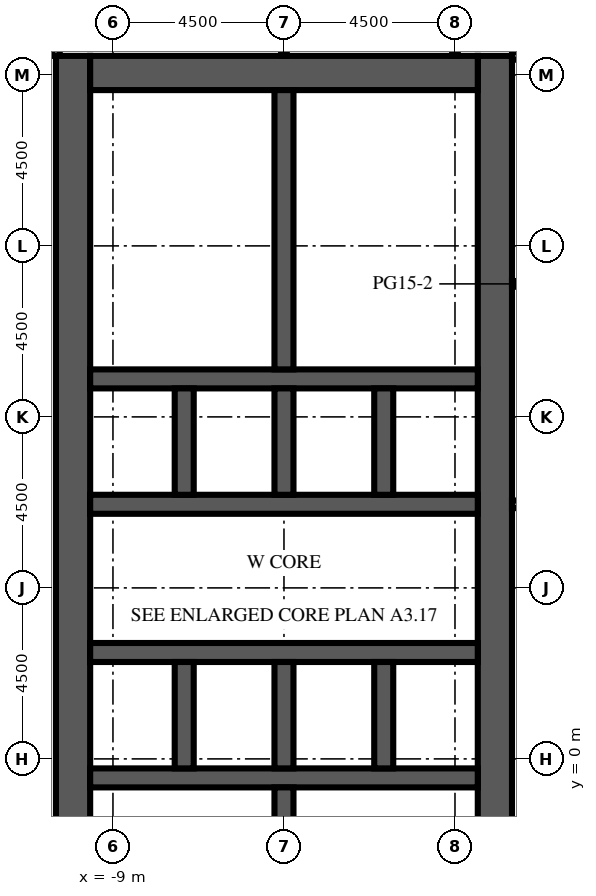
"""IFC4 building model, lengths in metres.
Left out: names, types, materials, properties, quantities, classifications, styles, units other than length and angle.
Written with IfcOpenShell. Run it as: python <this file> out.ifc"""

import sys

from ifc_helpers import new_model, si_unit, direction, frame, frame_2d, origin, place, context, subcontext, project, spatial, rectangle, extrude, element, fill, save


model = new_model("IFC4")
c1 = context("Model", 3, precision=1e-05, world=origin(), true_north=direction((0.0, 1.0)))
c2 = subcontext(c1, "Body", "Model", "MODEL_VIEW")
j1 = project(units=[si_unit("LENGTHUNIT", "METRE"), si_unit("PLANEANGLEUNIT", "RADIAN")], contexts=[c1])
p1 = place(None, origin())
s1 = spatial("IfcSite", under=j1, at=p1, CompositionType="ELEMENT")
p2 = place(p1, origin())
s2 = spatial("IfcBuilding", under=s1, at=p2, CompositionType="ELEMENT")
p3 = place(p2, frame((0.0, 0.0, 106.6)))
s3 = spatial("IfcBuildingStorey", under=s2, at=p3, CompositionType="ELEMENT", Elevation=106.6)
p4 = place(p3, frame((-10.05, -9.0, 0.0), z_axis=(0.0, 0.0, 1.0), x_axis=(0.0, 1.0, 0.0)))
e1 = element("IfcWall", 1, at=p4, inside=s3, PredefinedType="SHEAR", context=c2, shape_type="SweptSolid", body=[
    extrude(rectangle(XDim=27.5, YDim=0.9, at=frame_2d((13.75, 0.0))), origin(), (0.0, 0.0, 1.0), 4.1),
])
p5 = place(p4, frame((12.55, 0.0, 0.0)))
e2 = element("IfcOpeningElement", 2, at=p5, cuts=e1, PredefinedType="OPENING", context=c2, shape_type="SweptSolid", body=[
    extrude(rectangle(XDim=2.4, YDim=2.4, at=frame_2d((1.2, 1.2))), frame((0.0, 0.46, 0.0), z_axis=(0.0, -1.0, 0.0), x_axis=(1.0, 0.0, 0.0)), (0.0, 0.0, 1.0), 0.92),
])
p6 = place(p4, frame((6.825, 0.0, 0.0)))
e3 = element("IfcOpeningElement", 3, at=p6, cuts=e1, PredefinedType="OPENING", context=c2, shape_type="SweptSolid", body=[
    extrude(rectangle(XDim=1.2, YDim=2.1, at=frame_2d((0.6, 1.05))), frame((0.0, 0.46, 0.0), z_axis=(0.0, -1.0, 0.0), x_axis=(1.0, 0.0, 0.0)), (0.0, 0.0, 1.0), 0.92),
])
p7 = place(p4, frame((19.475, 0.0, 0.0)))
e4 = element("IfcOpeningElement", 4, at=p7, cuts=e1, PredefinedType="OPENING", context=c2, shape_type="SweptSolid", body=[
    extrude(rectangle(XDim=1.2, YDim=2.1, at=frame_2d((0.6, 1.05))), frame((0.0, 0.46, 0.0), z_axis=(0.0, -1.0, 0.0), x_axis=(1.0, 0.0, 0.0)), (0.0, 0.0, 1.0), 0.92),
])
p8 = place(p3, frame((1.05, -9.0, 0.0), z_axis=(0.0, 0.0, 1.0), x_axis=(0.0, 1.0, 0.0)))
e5 = element("IfcWall", 5, at=p8, inside=s3, PredefinedType="SHEAR", context=c2, shape_type="SweptSolid", body=[
    extrude(rectangle(XDim=27.5, YDim=0.9, at=frame_2d((13.75, 0.0))), origin(), (0.0, 0.0, 1.0), 4.1),
])
p9 = place(p8, frame((12.55, 0.0, 0.0)))
e6 = element("IfcOpeningElement", 6, at=p9, cuts=e5, PredefinedType="OPENING", context=c2, shape_type="SweptSolid", body=[
    extrude(rectangle(XDim=2.4, YDim=2.4, at=frame_2d((1.2, 1.2))), frame((0.0, 0.46, 0.0), z_axis=(0.0, -1.0, 0.0), x_axis=(1.0, 0.0, 0.0)), (0.0, 0.0, 1.0), 0.92),
])
p10 = place(p8, frame((3.893, 0.0, 0.0)))
e7 = element("IfcOpeningElement", 7, at=p10, cuts=e5, PredefinedType="OPENING", context=c2, shape_type="SweptSolid", body=[
    extrude(rectangle(XDim=0.923, YDim=2.1, at=frame_2d((0.461, 1.05))), frame((0.0, 0.46, 0.0), z_axis=(0.0, -1.0, 0.0), x_axis=(1.0, 0.0, 0.0)), (0.0, 0.0, 1.0), 0.92),
])
p11 = place(p8, frame((23.427, 0.0, 0.0)))
e8 = element("IfcOpeningElement", 8, at=p11, cuts=e5, PredefinedType="OPENING", context=c2, shape_type="SweptSolid", body=[
    extrude(rectangle(XDim=1.2, YDim=2.1, at=frame_2d((0.6, 1.05))), frame((0.0, 0.46, 0.0), z_axis=(0.0, -1.0, 0.0), x_axis=(1.0, 0.0, 0.0)), (0.0, 0.0, 1.0), 0.92),
])
p12 = place(p3, frame((-9.6, 18.05, 0.0), z_axis=(0.0, 0.0, 1.0), x_axis=(1.0, 0.0, 0.0)))
e9 = element("IfcWall", 9, at=p12, inside=s3, PredefinedType="SHEAR", context=c2, shape_type="SweptSolid", body=[
    extrude(rectangle(XDim=10.2, YDim=0.9, at=frame_2d((5.1, 0.0))), origin(), (0.0, 0.0, 1.0), 4.1),
])
p13 = place(p3, frame((-9.6, -0.5, 0.0), z_axis=(0.0, 0.0, 1.0), x_axis=(1.0, 0.0, 0.0)))
e10 = element("IfcWall", 10, at=p13, inside=s3, PredefinedType="SHEAR", context=c2, shape_type="SweptSolid", body=[
    extrude(rectangle(XDim=10.2, YDim=0.5, at=frame_2d((5.1, 0.0))), origin(), (0.0, 0.0, 1.0), 4.1),
])
p14 = place(p3, frame((-9.6, 2.8, 0.0), z_axis=(0.0, 0.0, 1.0), x_axis=(1.0, 0.0, 0.0)))
e11 = element("IfcWall", 11, at=p14, inside=s3, PredefinedType="SHEAR", context=c2, shape_type="SweptSolid", body=[
    extrude(rectangle(XDim=10.2, YDim=0.5, at=frame_2d((5.1, 0.0))), origin(), (0.0, 0.0, 1.0), 4.1),
])
p15 = place(p14, frame((0.562, 0.0, 0.0)))
e12 = element("IfcOpeningElement", 12, at=p15, cuts=e11, PredefinedType="OPENING", context=c2, shape_type="SweptSolid", body=[
    extrude(rectangle(XDim=1.1, YDim=2.1, at=frame_2d((0.55, 1.05))), frame((0.0, 0.26, 0.0), z_axis=(0.0, -1.0, 0.0), x_axis=(1.0, 0.0, 0.0)), (0.0, 0.0, 1.0), 0.52),
])
p16 = place(p14, frame((3.238, 0.0, 0.0)))
e13 = element("IfcOpeningElement", 13, at=p16, cuts=e11, PredefinedType="OPENING", context=c2, shape_type="SweptSolid", body=[
    extrude(rectangle(XDim=1.1, YDim=2.1, at=frame_2d((0.55, 1.05))), frame((0.0, 0.26, 0.0), z_axis=(0.0, -1.0, 0.0), x_axis=(1.0, 0.0, 0.0)), (0.0, 0.0, 1.0), 0.52),
])
p17 = place(p14, frame((8.538, 0.0, 0.0)))
e14 = element("IfcOpeningElement", 14, at=p17, cuts=e11, PredefinedType="OPENING", context=c2, shape_type="SweptSolid", body=[
    extrude(rectangle(XDim=1.1, YDim=2.1, at=frame_2d((0.55, 1.05))), frame((0.0, 0.26, 0.0), z_axis=(0.0, -1.0, 0.0), x_axis=(1.0, 0.0, 0.0)), (0.0, 0.0, 1.0), 0.52),
])
p18 = place(p3, frame((-9.6, 6.7, 0.0), z_axis=(0.0, 0.0, 1.0), x_axis=(1.0, 0.0, 0.0)))
e15 = element("IfcWall", 15, at=p18, inside=s3, PredefinedType="SHEAR", context=c2, shape_type="SweptSolid", body=[
    extrude(rectangle(XDim=10.2, YDim=0.5, at=frame_2d((5.1, 0.0))), origin(), (0.0, 0.0, 1.0), 4.1),
])
p19 = place(p18, frame((0.562, 0.0, 0.0)))
e16 = element("IfcOpeningElement", 16, at=p19, cuts=e15, PredefinedType="OPENING", context=c2, shape_type="SweptSolid", body=[
    extrude(rectangle(XDim=1.1, YDim=2.1, at=frame_2d((0.55, 1.05))), frame((0.0, 0.26, 0.0), z_axis=(0.0, -1.0, 0.0), x_axis=(1.0, 0.0, 0.0)), (0.0, 0.0, 1.0), 0.52),
])
p20 = place(p18, frame((3.288, 0.0, 0.0)))
e17 = element("IfcOpeningElement", 17, at=p20, cuts=e15, PredefinedType="OPENING", context=c2, shape_type="SweptSolid", body=[
    extrude(rectangle(XDim=1.0, YDim=2.1, at=frame_2d((0.5, 1.05))), frame((0.0, 0.26, 0.0), z_axis=(0.0, -1.0, 0.0), x_axis=(1.0, 0.0, 0.0)), (0.0, 0.0, 1.0), 0.52),
])
p21 = place(p18, frame((5.913, 0.0, 0.0)))
e18 = element("IfcOpeningElement", 18, at=p21, cuts=e15, PredefinedType="OPENING", context=c2, shape_type="SweptSolid", body=[
    extrude(rectangle(XDim=1.0, YDim=2.1, at=frame_2d((0.5, 1.05))), frame((0.0, 0.26, 0.0), z_axis=(0.0, -1.0, 0.0), x_axis=(1.0, 0.0, 0.0)), (0.0, 0.0, 1.0), 0.52),
])
p22 = place(p18, frame((8.587, 0.0, 0.0)))
e19 = element("IfcOpeningElement", 19, at=p22, cuts=e15, PredefinedType="OPENING", context=c2, shape_type="SweptSolid", body=[
    extrude(rectangle(XDim=1.0, YDim=2.1, at=frame_2d((0.5, 1.05))), frame((0.0, 0.26, 0.0), z_axis=(0.0, -1.0, 0.0), x_axis=(1.0, 0.0, 0.0)), (0.0, 0.0, 1.0), 0.52),
])
p23 = place(p3, frame((-9.6, 10.0, 0.0), z_axis=(0.0, 0.0, 1.0), x_axis=(1.0, 0.0, 0.0)))
e20 = element("IfcWall", 20, at=p23, inside=s3, PredefinedType="SHEAR", context=c2, shape_type="SweptSolid", body=[
    extrude(rectangle(XDim=10.2, YDim=0.5, at=frame_2d((5.1, 0.0))), origin(), (0.0, 0.0, 1.0), 4.1),
])
for number, where, z_axis, x_axis in (
    (21, (-7.125, -0.25, 0.0), (0.0, 0.0, 1.0), (0.0, 1.0, 0.0)),
    (22, (-7.125, 6.95, 0.0), (0.0, 0.0, 1.0), (0.0, 1.0, 0.0)),
    (23, (-4.5, -0.25, 0.0), (0.0, 0.0, 1.0), (0.0, 1.0, 0.0)),
    (24, (-4.5, 6.95, 0.0), (0.0, 0.0, 1.0), (0.0, 1.0, 0.0)),
    (25, (-1.875, -0.25, 0.0), (0.0, 0.0, 1.0), (0.0, 1.0, 0.0)),
    (26, (-1.875, 6.95, 0.0), (0.0, 0.0, 1.0), (0.0, 1.0, 0.0)),
):
    element("IfcWall", number, at=place(p3, frame(where, z_axis=z_axis, x_axis=x_axis)), inside=s3, PredefinedType="SHEAR", context=c2, shape_type="SweptSolid", body=[
        extrude(rectangle(XDim=2.8, YDim=0.5, at=frame_2d((1.4, 0.0))), origin(), (0.0, 0.0, 1.0), 4.1),
    ])
for number, where, z_axis, x_axis in (
    (27, (-4.5, -8.1, 0.0), (0.0, 0.0, 1.0), (0.0, 1.0, 0.0)),
    (28, (-4.5, 10.25, 0.0), (0.0, 0.0, 1.0), (0.0, 1.0, 0.0)),
):
    element("IfcWall", number, at=place(p3, frame(where, z_axis=z_axis, x_axis=x_axis)), inside=s3, PredefinedType="SHEAR", context=c2, shape_type="SweptSolid", body=[
        extrude(rectangle(XDim=7.35, YDim=0.5, at=frame_2d((3.675, 0.0))), origin(), (0.0, 0.0, 1.0), 4.1),
    ])
p24 = place(p3, frame((-2.407, -3.984, 0.0), z_axis=(0.0, 0.0, 1.0), x_axis=(0.0, 1.0, 0.0)))
e29 = element("IfcWall", 29, at=p24, inside=s3, PredefinedType="PARTITIONING", context=c2, shape_type="SweptSolid", body=[
    extrude(rectangle(XDim=3.234, YDim=0.1, at=frame_2d((1.617, 0.0))), origin(), (0.0, 0.0, 1.0), 3.5),
])
p25 = place(p3, frame((-0.7, 12.455, 0.0), z_axis=(0.0, 0.0, 1.0), x_axis=(1.0, 0.0, 0.0)))
e30 = element("IfcWall", 30, at=p25, inside=s3, PredefinedType="PARTITIONING", context=c2, shape_type="SweptSolid", body=[
    extrude(rectangle(XDim=1.3, YDim=0.1, at=frame_2d((0.65, 0.0))), origin(), (0.0, 0.0, 1.0), 3.5),
])
p26 = place(p25, frame((0.2, 0.0, 0.0)))
e31 = element("IfcOpeningElement", 31, at=p26, cuts=e30, PredefinedType="OPENING", context=c2, shape_type="SweptSolid", body=[
    extrude(rectangle(XDim=0.9, YDim=2.1, at=frame_2d((0.45, 1.05))), frame((0.0, 0.06, 0.0), z_axis=(0.0, -1.0, 0.0), x_axis=(1.0, 0.0, 0.0)), (0.0, 0.0, 1.0), 0.12),
])
p27 = place(p3, frame((-4.25, 12.455, 0.0), z_axis=(0.0, 0.0, 1.0), x_axis=(1.0, 0.0, 0.0)))
e32 = element("IfcWall", 32, at=p27, inside=s3, PredefinedType="PARTITIONING", context=c2, shape_type="SweptSolid", body=[
    extrude(rectangle(XDim=3.55, YDim=0.1, at=frame_2d((1.775, 0.0))), origin(), (0.0, 0.0, 1.0), 3.5),
])
p28 = place(p3, frame((-0.7, 12.455, 0.0), z_axis=(0.0, 0.0, 1.0), x_axis=(0.0, 1.0, 0.0)))
e33 = element("IfcWall", 33, at=p28, inside=s3, PredefinedType="PARTITIONING", context=c2, shape_type="SweptSolid", body=[
    extrude(rectangle(XDim=2.573, YDim=0.1, at=frame_2d((1.286, 0.0))), origin(), (0.0, 0.0, 1.0), 3.5),
])
p29 = place(p28, frame((0.786, 0.0, 0.0)))
e34 = element("IfcOpeningElement", 34, at=p29, cuts=e33, PredefinedType="OPENING", context=c2, shape_type="SweptSolid", body=[
    extrude(rectangle(XDim=1.0, YDim=2.1, at=frame_2d((0.5, 1.05))), frame((0.0, 0.06, 0.0), z_axis=(0.0, -1.0, 0.0), x_axis=(1.0, 0.0, 0.0)), (0.0, 0.0, 1.0), 0.12),
])
p30 = place(p3, frame((-0.7, 15.028, 0.0), z_axis=(0.0, 0.0, 1.0), x_axis=(0.0, 1.0, 0.0)))
e35 = element("IfcWall", 35, at=p30, inside=s3, PredefinedType="PARTITIONING", context=c2, shape_type="SweptSolid", body=[
    extrude(rectangle(XDim=2.573, YDim=0.1, at=frame_2d((1.286, 0.0))), origin(), (0.0, 0.0, 1.0), 3.5),
])
p31 = place(p30, frame((0.786, 0.0, 0.0)))
e36 = element("IfcOpeningElement", 36, at=p31, cuts=e35, PredefinedType="OPENING", context=c2, shape_type="SweptSolid", body=[
    extrude(rectangle(XDim=1.0, YDim=2.1, at=frame_2d((0.5, 1.05))), frame((0.0, 0.06, 0.0), z_axis=(0.0, -1.0, 0.0), x_axis=(1.0, 0.0, 0.0)), (0.0, 0.0, 1.0), 0.12),
])
p32 = place(p3, frame((-4.25, 15.028, 0.0), z_axis=(0.0, 0.0, 1.0), x_axis=(1.0, 0.0, 0.0)))
e37 = element("IfcWall", 37, at=p32, inside=s3, PredefinedType="PARTITIONING", context=c2, shape_type="SweptSolid", body=[
    extrude(rectangle(XDim=3.55, YDim=0.1, at=frame_2d((1.775, 0.0))), origin(), (0.0, 0.0, 1.0), 3.5),
])
p33 = place(p3, frame((-10.5, 31.35, 0.0), z_axis=(0.0, 0.0, 1.0), x_axis=(0.0, -1.0, 0.0)))
e38 = element("IfcWall", 38, at=p33, inside=s3, PredefinedType="PARTITIONING", context=c2, shape_type="SweptSolid", body=[
    extrude(rectangle(XDim=12.85, YDim=0.2, at=frame_2d((6.425, 0.0))), origin(), (0.0, 0.0, 1.0), 3.5),
])
p34 = place(p33, frame((2.5, 0.0, 0.0)))
e39 = element("IfcOpeningElement", 39, at=p34, cuts=e38, PredefinedType="OPENING", context=c2, shape_type="SweptSolid", body=[
    extrude(rectangle(XDim=1.0, YDim=2.1, at=frame_2d((0.5, 1.05))), frame((0.0, 0.11, 0.0), z_axis=(0.0, -1.0, 0.0), x_axis=(1.0, 0.0, 0.0)), (0.0, 0.0, 1.0), 0.22),
])
p35 = place(p3, frame((-4.5, 30.9, 0.0), z_axis=(0.0, 0.0, 1.0), x_axis=(0.0, -1.0, 0.0)))
e40 = element("IfcWall", 40, at=p35, inside=s3, PredefinedType="PARTITIONING", context=c2, shape_type="SweptSolid", body=[
    extrude(rectangle(XDim=12.4, YDim=0.15, at=frame_2d((6.2, 0.0))), origin(), (0.0, 0.0, 1.0), 3.5),
])
p36 = place(p35, frame((3.3, 0.0, 0.0)))
e41 = element("IfcOpeningElement", 41, at=p36, cuts=e40, PredefinedType="OPENING", context=c2, shape_type="SweptSolid", body=[
    extrude(rectangle(XDim=1.0, YDim=2.1, at=frame_2d((0.5, 1.05))), frame((0.0, 0.085, 0.0), z_axis=(0.0, -1.0, 0.0), x_axis=(1.0, 0.0, 0.0)), (0.0, 0.0, 1.0), 0.17),
])
p37 = place(p3, frame((0.0, 18.5, 0.0), z_axis=(0.0, 0.0, 1.0), x_axis=(0.0, 1.0, 0.0)))
e42 = element("IfcWall", 42, at=p37, inside=s3, PredefinedType="PARTITIONING", context=c2, shape_type="SweptSolid", body=[
    extrude(rectangle(XDim=3.3, YDim=0.15, at=frame_2d((1.65, 0.0))), origin(), (0.0, 0.0, 1.0), 3.5),
])
p38 = place(p3, frame((1.5, 6.7, 0.0), z_axis=(0.0, 0.0, 1.0), x_axis=(1.0, 0.0, 0.0)))
e43 = element("IfcWall", 43, at=p38, inside=s3, PredefinedType="PARTITIONING", context=c2, shape_type="SweptSolid", body=[
    extrude(rectangle(XDim=4.5, YDim=0.2, at=frame_2d((2.25, 0.0))), origin(), (0.0, 0.0, 1.0), 3.5),
])
p39 = place(p38, frame((2.35, 0.0, 0.0)))
e44 = element("IfcOpeningElement", 44, at=p39, cuts=e43, PredefinedType="OPENING", context=c2, shape_type="SweptSolid", body=[
    extrude(rectangle(XDim=1.0, YDim=2.1, at=frame_2d((0.5, 1.05))), frame((0.0, 0.11, 0.0), z_axis=(0.0, -1.0, 0.0), x_axis=(1.0, 0.0, 0.0)), (0.0, 0.0, 1.0), 0.22),
])
p40 = place(p3, frame((1.5, 12.5, 0.0), z_axis=(0.0, 0.0, 1.0), x_axis=(1.0, 0.0, 0.0)))
e45 = element("IfcWall", 45, at=p40, inside=s3, PredefinedType="PARTITIONING", context=c2, shape_type="SweptSolid", body=[
    extrude(rectangle(XDim=4.5, YDim=0.15, at=frame_2d((2.25, 0.0))), origin(), (0.0, 0.0, 1.0), 3.5),
])
p41 = place(p40, frame((1.85, 0.0, 0.0)))
e46 = element("IfcOpeningElement", 46, at=p41, cuts=e45, PredefinedType="OPENING", context=c2, shape_type="SweptSolid", body=[
    extrude(rectangle(XDim=1.0, YDim=2.1, at=frame_2d((0.5, 1.05))), frame((0.0, 0.085, 0.0), z_axis=(0.0, -1.0, 0.0), x_axis=(1.0, 0.0, 0.0)), (0.0, 0.0, 1.0), 0.17),
])
p42 = place(p3, frame((1.5, 18.5, 0.0), z_axis=(0.0, 0.0, 1.0), x_axis=(1.0, 0.0, 0.0)))
e47 = element("IfcWall", 47, at=p42, inside=s3, PredefinedType="PARTITIONING", context=c2, shape_type="SweptSolid", body=[
    extrude(rectangle(XDim=4.5, YDim=0.2, at=frame_2d((2.25, 0.0))), origin(), (0.0, 0.0, 1.0), 3.5),
])
p43 = place(p15, origin())
e48 = element("IfcDoor", 48, at=p43, inside=s3, OperationType="DOUBLE_DOOR_SLIDING", PredefinedType="DOOR", context=c2, shape_type="SweptSolid", body=[
    extrude(rectangle(XDim=1.1, YDim=2.1, at=frame_2d((0.55, 1.05))), frame((0.0, 0.025, 0.0), z_axis=(0.0, -1.0, 0.0), x_axis=(1.0, 0.0, 0.0)), (0.0, 0.0, 1.0), 0.05),
])
fill(e12, e48)
p44 = place(p16, origin())
e49 = element("IfcDoor", 49, at=p44, inside=s3, OperationType="DOUBLE_DOOR_SLIDING", PredefinedType="DOOR", context=c2, shape_type="SweptSolid", body=[
    extrude(rectangle(XDim=1.1, YDim=2.1, at=frame_2d((0.55, 1.05))), frame((0.0, 0.025, 0.0), z_axis=(0.0, -1.0, 0.0), x_axis=(1.0, 0.0, 0.0)), (0.0, 0.0, 1.0), 0.05),
])
fill(e13, e49)
p45 = place(p17, origin())
e50 = element("IfcDoor", 50, at=p45, inside=s3, OperationType="DOUBLE_DOOR_SLIDING", PredefinedType="DOOR", context=c2, shape_type="SweptSolid", body=[
    extrude(rectangle(XDim=1.1, YDim=2.1, at=frame_2d((0.55, 1.05))), frame((0.0, 0.025, 0.0), z_axis=(0.0, -1.0, 0.0), x_axis=(1.0, 0.0, 0.0)), (0.0, 0.0, 1.0), 0.05),
])
fill(e14, e50)
p46 = place(p19, origin())
e51 = element("IfcDoor", 51, at=p46, inside=s3, OperationType="DOUBLE_DOOR_SLIDING", PredefinedType="DOOR", context=c2, shape_type="SweptSolid", body=[
    extrude(rectangle(XDim=1.1, YDim=2.1, at=frame_2d((0.55, 1.05))), frame((0.0, 0.025, 0.0), z_axis=(0.0, -1.0, 0.0), x_axis=(1.0, 0.0, 0.0)), (0.0, 0.0, 1.0), 0.05),
])
fill(e16, e51)
p47 = place(p5, origin())
e52 = element("IfcDoor", 52, at=p47, inside=s3, OperationType="DOUBLE_DOOR_DOUBLE_SWING", PredefinedType="DOOR", context=c2, shape_type="SweptSolid", body=[
    extrude(rectangle(XDim=2.4, YDim=2.4, at=frame_2d((1.2, 1.2))), frame((0.0, 0.025, 0.0), z_axis=(0.0, -1.0, 0.0), x_axis=(1.0, 0.0, 0.0)), (0.0, 0.0, 1.0), 0.05),
])
fill(e2, e52)
p48 = place(p9, origin())
e53 = element("IfcDoor", 53, at=p48, inside=s3, OperationType="DOUBLE_DOOR_DOUBLE_SWING", PredefinedType="DOOR", context=c2, shape_type="SweptSolid", body=[
    extrude(rectangle(XDim=2.4, YDim=2.4, at=frame_2d((1.2, 1.2))), frame((0.0, 0.025, 0.0), z_axis=(0.0, -1.0, 0.0), x_axis=(1.0, 0.0, 0.0)), (0.0, 0.0, 1.0), 0.05),
])
fill(e6, e53)
p49 = place(p6, origin())
e54 = element("IfcDoor", 54, at=p49, inside=s3, OperationType="SINGLE_SWING_LEFT", PredefinedType="DOOR", context=c2, shape_type="SweptSolid", body=[
    extrude(rectangle(XDim=1.2, YDim=2.1, at=frame_2d((0.6, 1.05))), frame((0.0, 0.025, 0.0), z_axis=(0.0, -1.0, 0.0), x_axis=(1.0, 0.0, 0.0)), (0.0, 0.0, 1.0), 0.05),
])
fill(e3, e54)
p50 = place(p7, origin())
e55 = element("IfcDoor", 55, at=p50, inside=s3, OperationType="SINGLE_SWING_LEFT", PredefinedType="DOOR", context=c2, shape_type="SweptSolid", body=[
    extrude(rectangle(XDim=1.2, YDim=2.1, at=frame_2d((0.6, 1.05))), frame((0.0, 0.025, 0.0), z_axis=(0.0, -1.0, 0.0), x_axis=(1.0, 0.0, 0.0)), (0.0, 0.0, 1.0), 0.05),
])
fill(e4, e55)
p51 = place(p20, origin())
e56 = element("IfcDoor", 56, at=p51, inside=s3, OperationType="SINGLE_SWING_RIGHT", PredefinedType="DOOR", context=c2, shape_type="SweptSolid", body=[
    extrude(rectangle(XDim=1.0, YDim=2.1, at=frame_2d((0.5, 1.05))), frame((0.0, 0.025, 0.0), z_axis=(0.0, -1.0, 0.0), x_axis=(1.0, 0.0, 0.0)), (0.0, 0.0, 1.0), 0.05),
])
fill(e17, e56)
p52 = place(p21, origin())
e57 = element("IfcDoor", 57, at=p52, inside=s3, OperationType="SINGLE_SWING_LEFT", PredefinedType="DOOR", context=c2, shape_type="SweptSolid", body=[
    extrude(rectangle(XDim=1.0, YDim=2.1, at=frame_2d((0.5, 1.05))), frame((0.0, 0.025, 0.0), z_axis=(0.0, -1.0, 0.0), x_axis=(1.0, 0.0, 0.0)), (0.0, 0.0, 1.0), 0.05),
])
fill(e18, e57)
p53 = place(p22, origin())
e58 = element("IfcDoor", 58, at=p53, inside=s3, OperationType="SINGLE_SWING_RIGHT", PredefinedType="DOOR", context=c2, shape_type="SweptSolid", body=[
    extrude(rectangle(XDim=1.0, YDim=2.1, at=frame_2d((0.5, 1.05))), frame((0.0, 0.025, 0.0), z_axis=(0.0, -1.0, 0.0), x_axis=(1.0, 0.0, 0.0)), (0.0, 0.0, 1.0), 0.05),
])
fill(e19, e58)
p54 = place(p26, origin())
e59 = element("IfcDoor", 59, at=p54, inside=s3, OperationType="SINGLE_SWING_LEFT", PredefinedType="DOOR", context=c2, shape_type="SweptSolid", body=[
    extrude(rectangle(XDim=0.9, YDim=2.1, at=frame_2d((0.45, 1.05))), frame((0.0, 0.025, 0.0), z_axis=(0.0, -1.0, 0.0), x_axis=(1.0, 0.0, 0.0)), (0.0, 0.0, 1.0), 0.05),
])
fill(e31, e59)
p55 = place(p11, origin())
e60 = element("IfcDoor", 60, at=p55, inside=s3, OperationType="SINGLE_SWING_RIGHT", PredefinedType="DOOR", context=c2, shape_type="SweptSolid", body=[
    extrude(rectangle(XDim=1.2, YDim=2.1, at=frame_2d((0.6, 1.05))), frame((0.0, 0.425, 0.0), z_axis=(0.0, -1.0, 0.0), x_axis=(1.0, 0.0, 0.0)), (0.0, 0.0, 1.0), 0.05),
])
fill(e8, e60)
p56 = place(p29, origin())
e61 = element("IfcDoor", 61, at=p56, inside=s3, OperationType="SINGLE_SWING_LEFT", PredefinedType="DOOR", context=c2, shape_type="SweptSolid", body=[
    extrude(rectangle(XDim=1.0, YDim=2.1, at=frame_2d((0.5, 1.05))), frame((0.0, 0.025, 0.0), z_axis=(0.0, -1.0, 0.0), x_axis=(1.0, 0.0, 0.0)), (0.0, 0.0, 1.0), 0.05),
])
fill(e34, e61)
p57 = place(p31, origin())
e62 = element("IfcDoor", 62, at=p57, inside=s3, OperationType="SINGLE_SWING_RIGHT", PredefinedType="DOOR", context=c2, shape_type="SweptSolid", body=[
    extrude(rectangle(XDim=1.0, YDim=2.1, at=frame_2d((0.5, 1.05))), frame((0.0, 0.025, 0.0), z_axis=(0.0, -1.0, 0.0), x_axis=(1.0, 0.0, 0.0)), (0.0, 0.0, 1.0), 0.05),
])
fill(e36, e62)
save(model, sys.argv[1])
